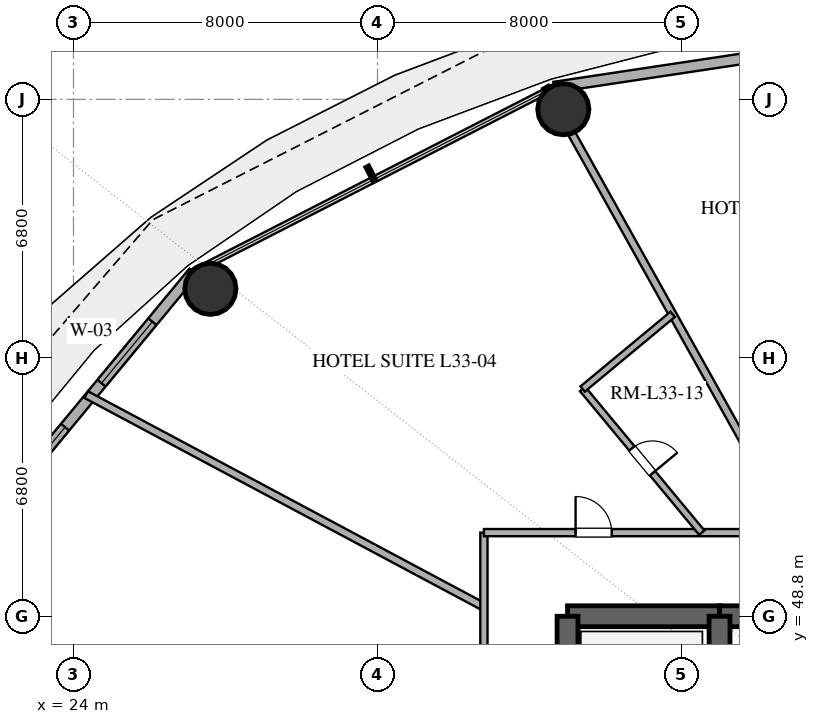
"""IFC4 building model, lengths in metres.
Left out: names, types, materials, properties, quantities, classifications, styles, units other than length and angle.
Written with IfcOpenShell. Run it as: python <this file> out.ifc"""

import sys

from ifc_helpers import new_model, si_unit, direction, frame, frame_2d, origin, origin_2d, place, context, subcontext, project, spatial, rectangle, hollow_circle, extrude, element, fill, save


model = new_model("IFC4")
c1 = context("Model", 3, precision=1e-05, world=origin(), true_north=direction((0.0, 1.0)))
c2 = subcontext(c1, "Body", "Model", "MODEL_VIEW")
j1 = project(units=[si_unit("LENGTHUNIT", "METRE"), si_unit("PLANEANGLEUNIT", "RADIAN")], contexts=[c1])
p1 = place(None, origin())
s1 = spatial("IfcSite", under=j1, at=p1, CompositionType="ELEMENT")
p2 = place(p1, origin())
s2 = spatial("IfcBuilding", under=s1, at=p2, CompositionType="ELEMENT")
p3 = place(p2, frame((0.0, 0.0, 130.8)))
s3 = spatial("IfcBuildingStorey", under=s2, at=p3, CompositionType="ELEMENT", Elevation=130.8)
p4 = place(p3, frame((37.0, 48.8, 0.0), z_axis=(0.0, 0.0, 1.0), x_axis=(1.0, 0.0, 0.0)))
e1 = element("IfcWall", 1, at=p4, inside=s3, PredefinedType="SHEAR", context=c2, shape_type="SweptSolid", body=[
    extrude(rectangle(XDim=4.0, YDim=0.55, at=frame_2d((2.0, 0.0))), origin(), (0.0, 0.0, 1.0), 3.32),
])
p5 = place(p3, frame((41.0, 48.8, 0.0), z_axis=(0.0, 0.0, 1.0), x_axis=(1.0, 0.0, 0.0)))
e2 = element("IfcWall", 2, at=p5, inside=s3, PredefinedType="SHEAR", context=c2, shape_type="SweptSolid", body=[
    extrude(rectangle(XDim=14.0, YDim=0.55, at=frame_2d((7.0, 0.0))), origin(), (0.0, 0.0, 1.0), 3.32),
])
p6 = place(p5, frame((6.1, 0.0, 0.0)))
e3 = element("IfcOpeningElement", 3, at=p6, cuts=e2, PredefinedType="OPENING", context=c2, shape_type="SweptSolid", body=[
    extrude(rectangle(XDim=1.8, YDim=2.25, at=frame_2d((0.9, 1.125))), frame((0.0, 0.285, 0.0), z_axis=(0.0, -1.0, 0.0), x_axis=(1.0, 0.0, 0.0)), (0.0, 0.0, 1.0), 0.57),
])
p7 = place(p3, frame((37.0, 35.2, 0.0), z_axis=(0.0, 0.0, 1.0), x_axis=(0.0, 1.0, 0.0)))
e4 = element("IfcWall", 4, at=p7, inside=s3, PredefinedType="SHEAR", context=c2, shape_type="SweptSolid", body=[
    extrude(rectangle(XDim=13.6, YDim=0.55, at=frame_2d((6.8, 0.0))), origin(), (0.0, 0.0, 1.0), 3.32),
])
p8 = place(p7, frame((1.5, 0.0, 0.0)))
e5 = element("IfcOpeningElement", 5, at=p8, cuts=e4, PredefinedType="OPENING", context=c2, shape_type="SweptSolid", body=[
    extrude(rectangle(XDim=1.2, YDim=2.15, at=frame_2d((0.6, 1.075))), frame((0.0, 0.285, 0.0), z_axis=(0.0, -1.0, 0.0), x_axis=(1.0, 0.0, 0.0)), (0.0, 0.0, 1.0), 0.57),
])
p9 = place(p3, frame((41.0, 35.2, 0.0), z_axis=(0.0, 0.0, 1.0), x_axis=(0.0, 1.0, 0.0)))
e6 = element("IfcWall", 6, at=p9, inside=s3, PredefinedType="SHEAR", context=c2, shape_type="SweptSolid", body=[
    extrude(rectangle(XDim=13.6, YDim=0.55, at=frame_2d((6.8, 0.0))), origin(), (0.0, 0.0, 1.0), 3.32),
])
p10 = place(p9, frame((1.15, 0.0, 0.0)))
e7 = element("IfcOpeningElement", 7, at=p10, cuts=e6, PredefinedType="OPENING", context=c2, shape_type="SweptSolid", body=[
    extrude(rectangle(XDim=1.1, YDim=2.2, at=frame_2d((0.55, 1.1))), frame((0.0, 0.285, 0.0), z_axis=(0.0, -1.0, 0.0), x_axis=(1.0, 0.0, 0.0)), (0.0, 0.0, 1.0), 0.57),
])
for number, where, z_axis, x_axis in (
    (8, (36.89, 62.141, 0.0), (0.0, 0.0, 1.0), (1.0, 0.0, 0.0)),
    (9, (27.602, 57.415, 0.0), (0.0, 0.0, 1.0), (1.0, 0.0, 0.0)),
):
    element("IfcColumn", number, at=place(p3, frame(where, z_axis=z_axis, x_axis=x_axis)), inside=s3, PredefinedType="COLUMN", context=c2, shape_type="SweptSolid", body=[
        extrude(hollow_circle(Radius=0.675, WallThickness=0.036, at=origin_2d()), origin(), (0.0, 0.0, 1.0), 3.32),
    ])
p11 = place(p3, frame((48.0, 64.43, 0.0), z_axis=(0.0, 0.0, 1.0), x_axis=(-0.988877774656, -0.148730450117, 0.0)))
e10 = element("IfcWall", 10, at=p11, inside=s3, PredefinedType="SOLIDWALL", context=c2, shape_type="SweptSolid", body=[
    extrude(rectangle(XDim=11.479, YDim=0.28, at=frame_2d((5.74, 0.0))), origin(), (0.0, 0.0, 1.0), 3.32),
])
p12 = place(p11, frame((1.524, 0.0, 0.0)))
e11 = element("IfcOpeningElement", 11, at=p12, cuts=e10, PredefinedType="OPENING", context=c2, shape_type="SweptSolid", body=[
    extrude(rectangle(XDim=1.1, YDim=2.25, at=frame_2d((0.55, 1.125))), frame((0.0, 0.15, 0.0), z_axis=(0.0, -1.0, 0.0), x_axis=(1.0, 0.0, 0.0)), (0.0, 0.0, 1.0), 0.3),
])
p13 = place(p3, frame((27.16, 57.86, 0.0), z_axis=(0.0, 0.0, 1.0), x_axis=(-0.637505817448, -0.770445541696, 0.0)))
e12 = element("IfcWall", 12, at=p13, inside=s3, PredefinedType="SOLIDWALL", context=c2, shape_type="SweptSolid", body=[
    extrude(rectangle(XDim=9.445, YDim=0.28, at=frame_2d((4.723, 0.0))), origin(), (0.0, 0.0, 1.0), 3.32),
])
p14 = place(p13, frame((1.7, 0.0, 0.85)))
e13 = element("IfcOpeningElement", 13, at=p14, cuts=e12, PredefinedType="OPENING", context=c2, shape_type="SweptSolid", body=[
    extrude(rectangle(XDim=2.1, YDim=2.2, at=frame_2d((1.05, 1.1))), frame((0.0, 0.15, 0.0), z_axis=(0.0, -1.0, 0.0), x_axis=(1.0, 0.0, 0.0)), (0.0, 0.0, 1.0), 0.3),
])
p15 = place(p13, frame((5.303, 0.0, 0.85)))
e14 = element("IfcOpeningElement", 14, at=p15, cuts=e12, PredefinedType="OPENING", context=c2, shape_type="SweptSolid", body=[
    extrude(rectangle(XDim=1.8, YDim=2.2, at=frame_2d((0.9, 1.1))), frame((0.0, 0.15, 0.0), z_axis=(0.0, -1.0, 0.0), x_axis=(1.0, 0.0, 0.0)), (0.0, 0.0, 1.0), 0.3),
])
p16 = place(p3, frame((24.335, 54.631, 0.0), z_axis=(0.0, 0.0, 1.0), x_axis=(0.882197358086, -0.470879837524, 0.0)))
e15 = element("IfcWall", 15, at=p16, inside=s3, PredefinedType="PARTITIONING", context=c2, shape_type="SweptSolid", body=[
    extrude(rectangle(XDim=11.862, YDim=0.2, at=frame_2d((5.931, 0.0))), origin(), (0.0, 0.0, 1.0), 2.68),
])
p17 = place(p3, frame((34.8, 38.396, 0.0), z_axis=(0.0, 0.0, 1.0), x_axis=(0.0, 1.0, 0.0)))
e16 = element("IfcWall", 16, at=p17, inside=s3, PredefinedType="PARTITIONING", context=c2, shape_type="SweptSolid", body=[
    extrude(rectangle(XDim=12.604, YDim=0.19, at=frame_2d((6.302, 0.0))), origin(), (0.0, 0.0, 1.0), 2.68),
])
p18 = place(p17, frame((6.094, 0.0, 0.0)))
e17 = element("IfcOpeningElement", 17, at=p18, cuts=e16, PredefinedType="OPENING", context=c2, shape_type="SweptSolid", body=[
    extrude(rectangle(XDim=1.0, YDim=2.2, at=frame_2d((0.5, 1.1))), frame((0.0, 0.105, 0.0), z_axis=(0.0, -1.0, 0.0), x_axis=(1.0, 0.0, 0.0)), (0.0, 0.0, 1.0), 0.21),
])
p19 = place(p3, frame((42.974, 51.0, 0.0), z_axis=(0.0, 0.0, 1.0), x_axis=(-0.487587337482, 0.873074216964, 0.0)))
e18 = element("IfcWall", 18, at=p19, inside=s3, PredefinedType="PARTITIONING", context=c2, shape_type="SweptSolid", body=[
    extrude(rectangle(XDim=13.446, YDim=0.2, at=frame_2d((6.723, 0.0))), origin(), (0.0, 0.0, 1.0), 2.68),
])
p20 = place(p3, frame((34.8, 51.0, 0.0), z_axis=(0.0, 0.0, 1.0), x_axis=(1.0, 0.0, 0.0)))
e19 = element("IfcWall", 19, at=p20, inside=s3, PredefinedType="PARTITIONING", context=c2, shape_type="SweptSolid", body=[
    extrude(rectangle(XDim=8.21, YDim=0.19, at=frame_2d((4.105, 0.0))), origin(), (0.0, 0.0, 1.0), 2.68),
])
p21 = place(p20, frame((2.412, 0.0, 0.0)))
e20 = element("IfcOpeningElement", 20, at=p21, cuts=e19, PredefinedType="OPENING", context=c2, shape_type="SweptSolid", body=[
    extrude(rectangle(XDim=0.95, YDim=2.15, at=frame_2d((0.475, 1.075))), frame((0.0, 0.105, 0.0), z_axis=(0.0, -1.0, 0.0), x_axis=(1.0, 0.0, 0.0)), (0.0, 0.0, 1.0), 0.21),
])
p22 = place(p3, frame((37.398, 54.778, 0.0), z_axis=(0.0, 0.0, 1.0), x_axis=(0.638549285416, -0.769580931478, 0.0)))
e21 = element("IfcWall", 21, at=p22, inside=s3, PredefinedType="PLUMBINGWALL", context=c2, shape_type="SweptSolid", body=[
    extrude(rectangle(XDim=4.91, YDim=0.18, at=frame_2d((2.455, 0.0))), origin(), (0.0, 0.0, 1.0), 2.68),
])
p23 = place(p22, frame((2.03, 0.0, 0.0)))
e22 = element("IfcOpeningElement", 22, at=p23, cuts=e21, PredefinedType="OPENING", context=c2, shape_type="SweptSolid", body=[
    extrude(rectangle(XDim=0.85, YDim=2.1, at=frame_2d((0.425, 1.05))), frame((0.0, 0.1, 0.0), z_axis=(0.0, -1.0, 0.0), x_axis=(1.0, 0.0, 0.0)), (0.0, 0.0, 1.0), 0.2),
])
p24 = place(p3, frame((39.766, 56.743, 0.0), z_axis=(0.0, 0.0, 1.0), x_axis=(-0.769591554132, -0.638536482755, 0.0)))
e23 = element("IfcWall", 23, at=p24, inside=s3, PredefinedType="PLUMBINGWALL", context=c2, shape_type="SweptSolid", body=[
    extrude(rectangle(XDim=3.077, YDim=0.18, at=frame_2d((1.539, 0.0))), origin(), (0.0, 0.0, 1.0), 2.68),
])
p25 = place(p14, origin())
e24 = element("IfcWindow", 24, at=p25, inside=s3, PartitioningType="SINGLE_PANEL", PredefinedType="WINDOW", context=c2, shape_type="SweptSolid", body=[
    extrude(rectangle(XDim=2.1, YDim=2.2, at=frame_2d((1.05, 1.1))), frame((0.0, 0.03, 0.0), z_axis=(0.0, -1.0, 0.0), x_axis=(1.0, 0.0, 0.0)), (0.0, 0.0, 1.0), 0.06),
])
fill(e13, e24)
p26 = place(p15, origin())
e25 = element("IfcWindow", 25, at=p26, inside=s3, PartitioningType="SINGLE_PANEL", PredefinedType="WINDOW", context=c2, shape_type="SweptSolid", body=[
    extrude(rectangle(XDim=1.8, YDim=2.2, at=frame_2d((0.9, 1.1))), frame((0.0, 0.03, 0.0), z_axis=(0.0, -1.0, 0.0), x_axis=(1.0, 0.0, 0.0)), (0.0, 0.0, 1.0), 0.06),
])
fill(e14, e25)
p27 = place(p21, origin())
e26 = element("IfcDoor", 26, at=p27, inside=s3, OperationType="SINGLE_SWING_LEFT", PredefinedType="DOOR", context=c2, shape_type="SweptSolid", body=[
    extrude(rectangle(XDim=0.95, YDim=2.15, at=frame_2d((0.475, 1.075))), frame((0.0, 0.025, 0.0), z_axis=(0.0, -1.0, 0.0), x_axis=(1.0, 0.0, 0.0)), (0.0, 0.0, 1.0), 0.05),
])
fill(e20, e26)
p28 = place(p23, origin())
e27 = element("IfcDoor", 27, at=p28, inside=s3, OperationType="SINGLE_SWING_RIGHT", PredefinedType="DOOR", context=c2, shape_type="SweptSolid", body=[
    extrude(rectangle(XDim=0.85, YDim=2.1, at=frame_2d((0.425, 1.05))), frame((0.0, 0.025, 0.0), z_axis=(0.0, -1.0, 0.0), x_axis=(1.0, 0.0, 0.0)), (0.0, 0.0, 1.0), 0.05),
])
fill(e22, e27)
save(model, sys.argv[1])
